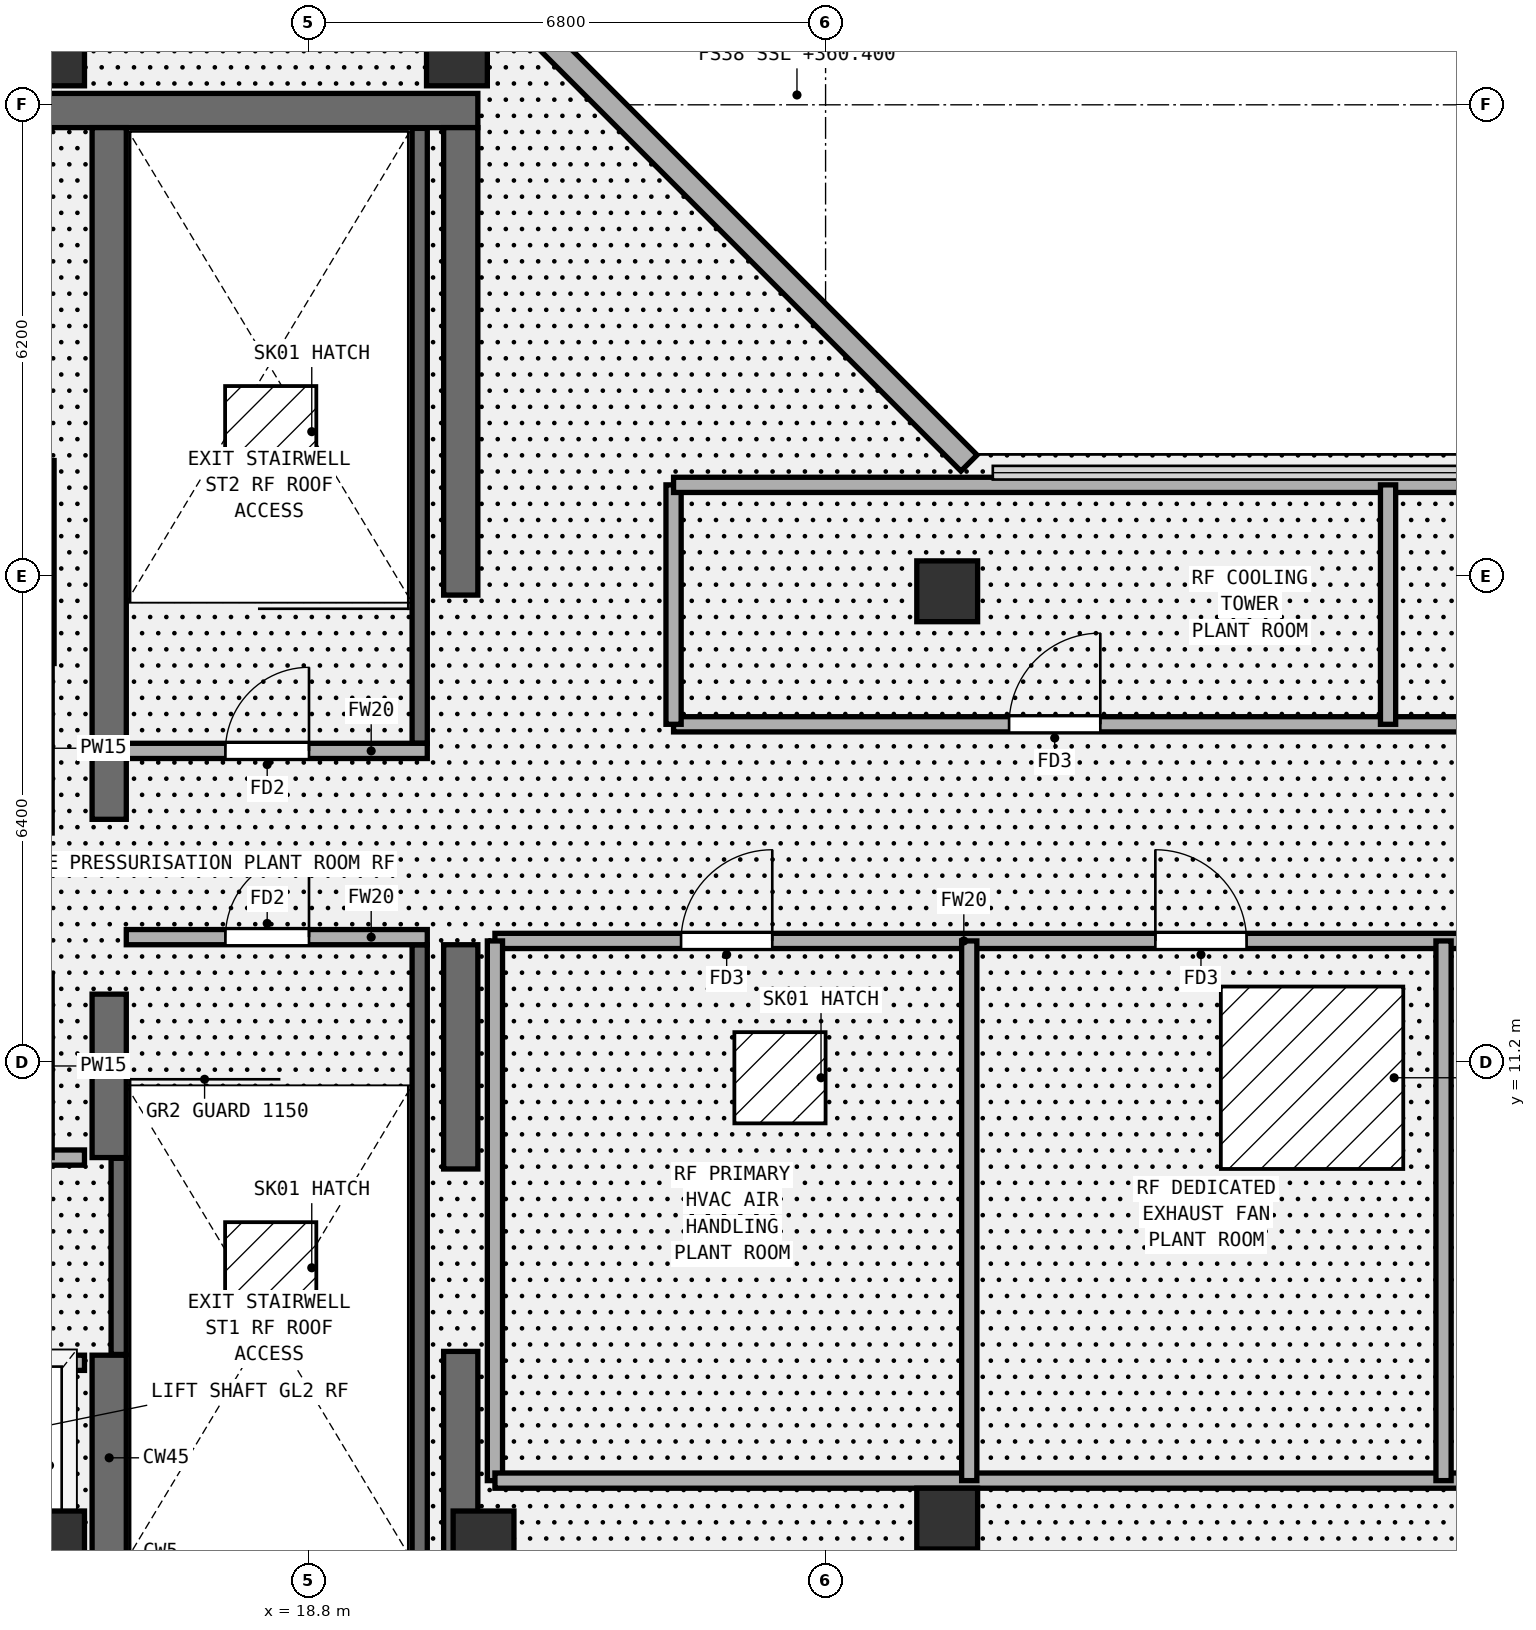
"""IFC4 building model, lengths in metres.
Left out: names, types, materials, properties, quantities, classifications, styles, units other than length and angle.
Written with IfcOpenShell. Run it as: python <this file> out.ifc"""

import sys

from ifc_helpers import new_model, si_unit, direction, frame, frame_2d, origin, origin_2d, place, context, subcontext, project, spatial, rectangle, extrude, element, fill, save


model = new_model("IFC4")
c1 = context("Model", 3, precision=1e-05, world=origin(), true_north=direction((0.0, 1.0)))
c2 = subcontext(c1, "Body", "Model", "MODEL_VIEW")
j1 = project(units=[si_unit("LENGTHUNIT", "METRE"), si_unit("PLANEANGLEUNIT", "RADIAN")], contexts=[c1])
p1 = place(None, origin())
s1 = spatial("IfcSite", under=j1, at=p1, CompositionType="ELEMENT")
p2 = place(p1, origin())
s2 = spatial("IfcBuilding", under=s1, at=p2, CompositionType="ELEMENT")
p3 = place(p2, frame((0.0, 0.0, 360.4)))
s3 = spatial("IfcBuildingStorey", under=s2, at=p3, CompositionType="ELEMENT", Elevation=360.4)
p4 = place(p3, frame((7.225, 23.725, 0.0), z_axis=(0.0, 0.0, 1.0), x_axis=(1.0, 0.0, 0.0)))
e1 = element("IfcWall", 1, at=p4, inside=s3, PredefinedType="SHEAR", context=c2, shape_type="SweptSolid", body=[
    extrude(rectangle(XDim=13.8, YDim=0.45, at=frame_2d((6.9, 0.0))), origin(), (0.0, 0.0, 1.0), 4.659),
])
p5 = place(p3, frame((20.8, 4.65, 0.0), z_axis=(0.0, 0.0, 1.0), x_axis=(0.0, 1.0, 0.0)))
e2 = element("IfcWall", 2, at=p5, inside=s3, PredefinedType="SHEAR", context=c2, shape_type="SweptSolid", body=[
    extrude(rectangle(XDim=2.75, YDim=0.45, at=frame_2d((1.375, 0.0))), origin(), (0.0, 0.0, 1.0), 4.787),
])
p6 = place(p3, frame((20.8, 9.8, 0.0), z_axis=(0.0, 0.0, 1.0), x_axis=(0.0, 1.0, 0.0)))
e3 = element("IfcWall", 3, at=p6, inside=s3, PredefinedType="SHEAR", context=c2, shape_type="SweptSolid", body=[
    extrude(rectangle(XDim=2.95, YDim=0.45, at=frame_2d((1.475, 0.0))), origin(), (0.0, 0.0, 1.0), 4.787),
])
p7 = place(p3, frame((20.8, 17.35, 0.0), z_axis=(0.0, 0.0, 1.0), x_axis=(0.0, 1.0, 0.0)))
e4 = element("IfcWall", 4, at=p7, inside=s3, PredefinedType="SHEAR", context=c2, shape_type="SweptSolid", body=[
    extrude(rectangle(XDim=6.15, YDim=0.45, at=frame_2d((3.075, 0.0))), origin(), (0.0, 0.0, 1.0), 4.787),
])
p8 = place(p3, frame((16.175, 4.65, 0.0), z_axis=(0.0, 0.0, 1.0), x_axis=(0.0, 1.0, 0.0)))
e5 = element("IfcWall", 5, at=p8, inside=s3, PredefinedType="SHEAR", context=c2, shape_type="SweptSolid", body=[
    extrude(rectangle(XDim=2.7, YDim=0.45, at=frame_2d((1.35, 0.0))), origin(), (0.0, 0.0, 1.0), 4.698),
])
p9 = place(p3, frame((16.175, 9.95, 0.0), z_axis=(0.0, 0.0, 1.0), x_axis=(0.0, 1.0, 0.0)))
e6 = element("IfcWall", 6, at=p9, inside=s3, PredefinedType="SHEAR", context=c2, shape_type="SweptSolid", body=[
    extrude(rectangle(XDim=2.15, YDim=0.45, at=frame_2d((1.075, 0.0))), origin(), (0.0, 0.0, 1.0), 4.698),
])
p10 = place(p3, frame((16.175, 14.4, 0.0), z_axis=(0.0, 0.0, 1.0), x_axis=(0.0, 1.0, 0.0)))
e7 = element("IfcWall", 7, at=p10, inside=s3, PredefinedType="SHEAR", context=c2, shape_type="SweptSolid", body=[
    extrude(rectangle(XDim=9.1, YDim=0.45, at=frame_2d((4.55, 0.0))), origin(), (0.0, 0.0, 1.0), 4.698),
])
p11 = place(p3, frame((15.45, 4.9, 0.0), z_axis=(0.0, 0.0, 1.0), x_axis=(1.0, 0.0, 0.0)))
e8 = element("IfcColumn", 8, at=p11, inside=s3, PredefinedType="COLUMN", context=c2, shape_type="SweptSolid", body=[
    extrude(rectangle(XDim=0.8, YDim=0.8, at=origin_2d()), origin(), (0.0, 0.0, 1.0), 4.684),
])
p12 = place(p3, frame((21.1, 4.9, 0.0), z_axis=(0.0, 0.0, 1.0), x_axis=(1.0, 0.0, 0.0)))
e9 = element("IfcColumn", 9, at=p12, inside=s3, PredefinedType="COLUMN", context=c2, shape_type="SweptSolid", body=[
    extrude(rectangle(XDim=0.8, YDim=0.8, at=origin_2d()), origin(), (0.0, 0.0, 1.0), 4.793),
])
p13 = place(p3, frame((15.45, 24.45, 0.0), z_axis=(0.0, 0.0, 1.0), x_axis=(1.0, 0.0, 0.0)))
e10 = element("IfcColumn", 10, at=p13, inside=s3, PredefinedType="COLUMN", context=c2, shape_type="SweptSolid", body=[
    extrude(rectangle(XDim=0.8, YDim=0.8, at=origin_2d()), origin(), (0.0, 0.0, 1.0), 4.684),
])
p14 = place(p3, frame((20.75, 24.45, 0.0), z_axis=(0.0, 0.0, 1.0), x_axis=(1.0, 0.0, 0.0)))
e11 = element("IfcColumn", 11, at=p14, inside=s3, PredefinedType="COLUMN", context=c2, shape_type="SweptSolid", body=[
    extrude(rectangle(XDim=0.8, YDim=0.8, at=origin_2d()), origin(), (0.0, 0.0, 1.0), 4.786),
])
for number, where, z_axis, x_axis in (
    (12, (27.2, 5.2, 0.0), (0.0, 0.0, 1.0), (1.0, 0.0, 0.0)),
    (13, (27.2, 17.4, 0.0), (0.0, 0.0, 1.0), (1.0, 0.0, 0.0)),
):
    element("IfcColumn", number, at=place(p3, frame(where, z_axis=z_axis, x_axis=x_axis)), inside=s3, PredefinedType="COLUMN", context=c2, shape_type="SweptSolid", body=[
        extrude(rectangle(XDim=0.8, YDim=0.8, at=origin_2d()), origin(), (0.0, 0.0, 1.0), 4.91),
    ])
p15 = place(p3, frame((27.487, 19.087, 0.0), z_axis=(0.0, 0.0, 1.0), x_axis=(-0.707106781187, 0.707106781187, 0.0)))
e14 = element("IfcWall", 14, at=p15, inside=s3, PredefinedType="PARAPET", context=c2, shape_type="SweptSolid", body=[
    extrude(rectangle(XDim=9.051, YDim=0.3, at=frame_2d((4.525, 0.0))), origin(), (0.0, 0.0, 1.0), 4.805),
])
p16 = place(p3, frame((16.3, 7.36, 0.0), z_axis=(0.0, 0.0, 1.0), x_axis=(0.0, 1.0, 0.0)))
e15 = element("IfcWall", 15, at=p16, inside=s3, PredefinedType="SHEAR", context=c2, shape_type="SweptSolid", body=[
    extrude(rectangle(XDim=2.58, YDim=0.2, at=frame_2d((1.29, 0.0))), origin(), (0.0, 0.0, 1.0), 4.48),
])
p17 = place(p3, frame((20.26, 4.66, 0.0), z_axis=(0.0, 0.0, 1.0), x_axis=(0.0, 1.0, 0.0)))
e16 = element("IfcWall", 16, at=p17, inside=s3, PredefinedType="SHEAR", context=c2, shape_type="SweptSolid", body=[
    extrude(rectangle(XDim=8.09, YDim=0.2, at=frame_2d((4.045, 0.0))), origin(), (0.0, 0.0, 1.0), 4.48),
])
p18 = place(p3, frame((16.4, 12.85, 0.0), z_axis=(0.0, 0.0, 1.0), x_axis=(1.0, 0.0, 0.0)))
e17 = element("IfcWall", 17, at=p18, inside=s3, PredefinedType="PARTITIONING", context=c2, shape_type="SweptSolid", body=[
    extrude(rectangle(XDim=3.96, YDim=0.2, at=frame_2d((1.98, 0.0))), origin(), (0.0, 0.0, 1.0), 4.48),
])
p19 = place(p18, frame((1.304, 0.0, 0.0)))
e18 = element("IfcOpeningElement", 18, at=p19, cuts=e17, PredefinedType="OPENING", context=c2, shape_type="SweptSolid", body=[
    extrude(rectangle(XDim=1.1, YDim=2.2, at=frame_2d((0.55, 1.1))), frame((0.0, 0.11, 0.0), z_axis=(0.0, -1.0, 0.0), x_axis=(1.0, 0.0, 0.0)), (0.0, 0.0, 1.0), 0.22),
])
p20 = place(p3, frame((20.26, 15.4, 0.0), z_axis=(0.0, 0.0, 1.0), x_axis=(0.0, 1.0, 0.0)))
e19 = element("IfcWall", 19, at=p20, inside=s3, PredefinedType="SHEAR", context=c2, shape_type="SweptSolid", body=[
    extrude(rectangle(XDim=8.09, YDim=0.2, at=frame_2d((4.045, 0.0))), origin(), (0.0, 0.0, 1.0), 4.48),
])
p21 = place(p3, frame((16.41, 15.3, 0.0), z_axis=(0.0, 0.0, 1.0), x_axis=(1.0, 0.0, 0.0)))
e20 = element("IfcWall", 20, at=p21, inside=s3, PredefinedType="PARTITIONING", context=c2, shape_type="SweptSolid", body=[
    extrude(rectangle(XDim=3.95, YDim=0.2, at=frame_2d((1.975, 0.0))), origin(), (0.0, 0.0, 1.0), 4.48),
])
p22 = place(p21, frame((1.294, 0.0, 0.0)))
e21 = element("IfcOpeningElement", 21, at=p22, cuts=e20, PredefinedType="OPENING", context=c2, shape_type="SweptSolid", body=[
    extrude(rectangle(XDim=1.1, YDim=2.2, at=frame_2d((0.55, 1.1))), frame((0.0, 0.11, 0.0), z_axis=(0.0, -1.0, 0.0), x_axis=(1.0, 0.0, 0.0)), (0.0, 0.0, 1.0), 0.22),
])
p23 = place(p3, frame((7.5, 7.25, 0.0), z_axis=(0.0, 0.0, 1.0), x_axis=(1.0, 0.0, 0.0)))
e22 = element("IfcWall", 22, at=p23, inside=s3, PredefinedType="PARTITIONING", context=c2, shape_type="SweptSolid", body=[
    extrude(rectangle(XDim=8.35, YDim=0.2, at=frame_2d((4.175, 0.0))), origin(), (0.0, 0.0, 1.0), 4.48),
])
p24 = place(p23, frame((0.53, 0.0, 0.0)))
e23 = element("IfcOpeningElement", 23, at=p24, cuts=e22, PredefinedType="OPENING", context=c2, shape_type="SweptSolid", body=[
    extrude(rectangle(XDim=1.1, YDim=2.2, at=frame_2d((0.55, 1.1))), frame((0.0, 0.11, 0.0), z_axis=(0.0, -1.0, 0.0), x_axis=(1.0, 0.0, 0.0)), (0.0, 0.0, 1.0), 0.22),
])
p25 = place(p23, frame((2.37, 0.0, 0.0)))
e24 = element("IfcOpeningElement", 24, at=p25, cuts=e22, PredefinedType="OPENING", context=c2, shape_type="SweptSolid", body=[
    extrude(rectangle(XDim=1.1, YDim=2.2, at=frame_2d((0.55, 1.1))), frame((0.0, 0.11, 0.0), z_axis=(0.0, -1.0, 0.0), x_axis=(1.0, 0.0, 0.0)), (0.0, 0.0, 1.0), 0.22),
])
p26 = place(p23, frame((4.33, 0.0, 0.0)))
e25 = element("IfcOpeningElement", 25, at=p26, cuts=e22, PredefinedType="OPENING", context=c2, shape_type="SweptSolid", body=[
    extrude(rectangle(XDim=1.1, YDim=2.2, at=frame_2d((0.55, 1.1))), frame((0.0, 0.11, 0.0), z_axis=(0.0, -1.0, 0.0), x_axis=(1.0, 0.0, 0.0)), (0.0, 0.0, 1.0), 0.22),
])
p27 = place(p23, frame((6.5, 0.0, 0.0)))
e26 = element("IfcOpeningElement", 26, at=p27, cuts=e22, PredefinedType="OPENING", context=c2, shape_type="SweptSolid", body=[
    extrude(rectangle(XDim=1.1, YDim=2.2, at=frame_2d((0.55, 1.1))), frame((0.0, 0.11, 0.0), z_axis=(0.0, -1.0, 0.0), x_axis=(1.0, 0.0, 0.0)), (0.0, 0.0, 1.0), 0.22),
])
p28 = place(p3, frame((7.5, 9.95, 0.0), z_axis=(0.0, 0.0, 1.0), x_axis=(1.0, 0.0, 0.0)))
e27 = element("IfcWall", 27, at=p28, inside=s3, PredefinedType="PARTITIONING", context=c2, shape_type="SweptSolid", body=[
    extrude(rectangle(XDim=8.35, YDim=0.2, at=frame_2d((4.175, 0.0))), origin(), (0.0, 0.0, 1.0), 4.48),
])
p29 = place(p3, frame((15.35, 9.95, 0.0), z_axis=(0.0, 0.0, 1.0), x_axis=(0.0, 1.0, 0.0)))
e28 = element("IfcWall", 28, at=p29, inside=s3, PredefinedType="PARTITIONING", context=c2, shape_type="SweptSolid", body=[
    extrude(rectangle(XDim=2.41, YDim=0.15, at=frame_2d((1.205, 0.0))), origin(), (0.0, 0.0, 1.0), 4.48),
])
p30 = place(p3, frame((15.35, 14.22, 0.0), z_axis=(0.0, 0.0, 1.0), x_axis=(0.0, 1.0, 0.0)))
e29 = element("IfcWall", 29, at=p30, inside=s3, PredefinedType="PARTITIONING", context=c2, shape_type="SweptSolid", body=[
    extrude(rectangle(XDim=2.23, YDim=0.15, at=frame_2d((1.115, 0.0))), origin(), (0.0, 0.0, 1.0), 4.48),
])
p31 = place(p3, frame((15.35, 16.45, 0.0), z_axis=(0.0, 0.0, 1.0), x_axis=(0.0, 1.0, 0.0)))
e30 = element("IfcWall", 30, at=p31, inside=s3, PredefinedType="PARTITIONING", context=c2, shape_type="SweptSolid", body=[
    extrude(rectangle(XDim=2.67, YDim=0.2, at=frame_2d((1.335, 0.0))), origin(), (0.0, 0.0, 1.0), 4.48),
])
p32 = place(p3, frame((23.6, 15.65, 0.0), z_axis=(0.0, 0.0, 1.0), x_axis=(1.0, 0.0, 0.0)))
e31 = element("IfcWall", 31, at=p32, inside=s3, PredefinedType="PARTITIONING", context=c2, shape_type="SweptSolid", body=[
    extrude(rectangle(XDim=20.2, YDim=0.2, at=frame_2d((10.1, 0.0))), origin(), (0.0, 0.0, 1.0), 4.48),
])
p33 = place(p32, frame((4.414, 0.0, 0.0)))
e32 = element("IfcOpeningElement", 32, at=p33, cuts=e31, PredefinedType="OPENING", context=c2, shape_type="SweptSolid", body=[
    extrude(rectangle(XDim=1.2, YDim=2.25, at=frame_2d((0.6, 1.125))), frame((0.0, 0.11, 0.0), z_axis=(0.0, -1.0, 0.0), x_axis=(1.0, 0.0, 0.0)), (0.0, 0.0, 1.0), 0.22),
])
p34 = place(p32, frame((14.271, 0.0, 0.0)))
e33 = element("IfcOpeningElement", 33, at=p34, cuts=e31, PredefinedType="OPENING", context=c2, shape_type="SweptSolid", body=[
    extrude(rectangle(XDim=1.2, YDim=2.25, at=frame_2d((0.6, 1.125))), frame((0.0, 0.11, 0.0), z_axis=(0.0, -1.0, 0.0), x_axis=(1.0, 0.0, 0.0)), (0.0, 0.0, 1.0), 0.22),
])
p35 = place(p3, frame((23.6, 15.65, 0.0), z_axis=(0.0, 0.0, 1.0), x_axis=(0.0, 1.0, 0.0)))
e34 = element("IfcWall", 34, at=p35, inside=s3, PredefinedType="PARTITIONING", context=c2, shape_type="SweptSolid", body=[
    extrude(rectangle(XDim=3.15, YDim=0.2, at=frame_2d((1.575, 0.0))), origin(), (0.0, 0.0, 1.0), 4.48),
])
p36 = place(p3, frame((23.6, 18.8, 0.0), z_axis=(0.0, 0.0, 1.0), x_axis=(1.0, 0.0, 0.0)))
e35 = element("IfcWall", 35, at=p36, inside=s3, PredefinedType="PARTITIONING", context=c2, shape_type="SweptSolid", body=[
    extrude(rectangle(XDim=20.2, YDim=0.2, at=frame_2d((10.1, 0.0))), origin(), (0.0, 0.0, 1.0), 4.48),
])
p37 = place(p3, frame((33.0, 15.65, 0.0), z_axis=(0.0, 0.0, 1.0), x_axis=(0.0, 1.0, 0.0)))
e36 = element("IfcWall", 36, at=p37, inside=s3, PredefinedType="PARTITIONING", context=c2, shape_type="SweptSolid", body=[
    extrude(rectangle(XDim=3.15, YDim=0.2, at=frame_2d((1.575, 0.0))), origin(), (0.0, 0.0, 1.0), 4.48),
])
p38 = place(p3, frame((21.25, 12.8, 0.0), z_axis=(0.0, 0.0, 1.0), x_axis=(1.0, 0.0, 0.0)))
e37 = element("IfcWall", 37, at=p38, inside=s3, PredefinedType="PARTITIONING", context=c2, shape_type="SweptSolid", body=[
    extrude(rectangle(XDim=24.95, YDim=0.2, at=frame_2d((12.475, 0.0))), origin(), (0.0, 0.0, 1.0), 4.48),
])
p39 = place(p38, frame((2.448, 0.0, 0.0)))
e38 = element("IfcOpeningElement", 38, at=p39, cuts=e37, PredefinedType="OPENING", context=c2, shape_type="SweptSolid", body=[
    extrude(rectangle(XDim=1.2, YDim=2.25, at=frame_2d((0.6, 1.125))), frame((0.0, 0.11, 0.0), z_axis=(0.0, -1.0, 0.0), x_axis=(1.0, 0.0, 0.0)), (0.0, 0.0, 1.0), 0.22),
])
p40 = place(p38, frame((8.689, 0.0, 0.0)))
e39 = element("IfcOpeningElement", 39, at=p40, cuts=e37, PredefinedType="OPENING", context=c2, shape_type="SweptSolid", body=[
    extrude(rectangle(XDim=1.2, YDim=2.25, at=frame_2d((0.6, 1.125))), frame((0.0, 0.11, 0.0), z_axis=(0.0, -1.0, 0.0), x_axis=(1.0, 0.0, 0.0)), (0.0, 0.0, 1.0), 0.22),
])
p41 = place(p38, frame((14.924, 0.0, 0.0)))
e40 = element("IfcOpeningElement", 40, at=p41, cuts=e37, PredefinedType="OPENING", context=c2, shape_type="SweptSolid", body=[
    extrude(rectangle(XDim=1.2, YDim=2.25, at=frame_2d((0.6, 1.125))), frame((0.0, 0.11, 0.0), z_axis=(0.0, -1.0, 0.0), x_axis=(1.0, 0.0, 0.0)), (0.0, 0.0, 1.0), 0.22),
])
p42 = place(p38, frame((21.159, 0.0, 0.0)))
e41 = element("IfcOpeningElement", 41, at=p42, cuts=e37, PredefinedType="OPENING", context=c2, shape_type="SweptSolid", body=[
    extrude(rectangle(XDim=1.2, YDim=2.25, at=frame_2d((0.6, 1.125))), frame((0.0, 0.11, 0.0), z_axis=(0.0, -1.0, 0.0), x_axis=(1.0, 0.0, 0.0)), (0.0, 0.0, 1.0), 0.22),
])
p43 = place(p3, frame((21.25, 5.7, 0.0), z_axis=(0.0, 0.0, 1.0), x_axis=(0.0, 1.0, 0.0)))
e42 = element("IfcWall", 42, at=p43, inside=s3, PredefinedType="PARTITIONING", context=c2, shape_type="SweptSolid", body=[
    extrude(rectangle(XDim=7.1, YDim=0.2, at=frame_2d((3.55, 0.0))), origin(), (0.0, 0.0, 1.0), 4.48),
])
p44 = place(p3, frame((21.25, 5.7, 0.0), z_axis=(0.0, 0.0, 1.0), x_axis=(1.0, 0.0, 0.0)))
e43 = element("IfcWall", 43, at=p44, inside=s3, PredefinedType="PARTITIONING", context=c2, shape_type="SweptSolid", body=[
    extrude(rectangle(XDim=24.95, YDim=0.2, at=frame_2d((12.475, 0.0))), origin(), (0.0, 0.0, 1.0), 4.48),
])
p45 = place(p3, frame((27.49, 5.7, 0.0), z_axis=(0.0, 0.0, 1.0), x_axis=(0.0, 1.0, 0.0)))
e44 = element("IfcWall", 44, at=p45, inside=s3, PredefinedType="PARTITIONING", context=c2, shape_type="SweptSolid", body=[
    extrude(rectangle(XDim=7.1, YDim=0.2, at=frame_2d((3.55, 0.0))), origin(), (0.0, 0.0, 1.0), 4.41),
])
p46 = place(p3, frame((33.73, 5.7, 0.0), z_axis=(0.0, 0.0, 1.0), x_axis=(0.0, 1.0, 0.0)))
e45 = element("IfcWall", 45, at=p46, inside=s3, PredefinedType="PARTITIONING", context=c2, shape_type="SweptSolid", body=[
    extrude(rectangle(XDim=7.1, YDim=0.2, at=frame_2d((3.55, 0.0))), origin(), (0.0, 0.0, 1.0), 4.48),
])
p47 = place(p3, frame((6.8, 4.0, 4.799), z_axis=(-0.019179722964, -9.68549e-07, 0.999816052195), x_axis=(0.999816052195, -8e-12, 0.019179722964)))
p48 = place(p47, frame((11.502, 4.5, 0.0)))
p49 = place(p48, frame((0.0, 0.0, -0.05)))
e46 = element("IfcWindow", 46, at=p49, inside=s3, PartitioningType="SINGLE_PANEL", PredefinedType="SKYLIGHT", context=c2, shape_type="SweptSolid", body=[
    extrude(rectangle(XDim=1.2, YDim=1.2, at=origin_2d()), origin(), (0.0, 0.0, 1.0), 0.05),
])
p50 = place(p47, frame((11.502, 15.5, 0.0)))
p51 = place(p50, frame((0.0, 0.0, -0.05)))
e47 = element("IfcWindow", 47, at=p51, inside=s3, PartitioningType="SINGLE_PANEL", PredefinedType="SKYLIGHT", context=c2, shape_type="SweptSolid", body=[
    extrude(rectangle(XDim=1.2, YDim=1.2, at=origin_2d()), origin(), (0.0, 0.0, 1.0), 0.05),
])
p52 = place(p47, frame((18.203, 7.0, 0.0)))
p53 = place(p52, frame((0.0, 0.0, -0.05)))
e48 = element("IfcWindow", 48, at=p53, inside=s3, PartitioningType="SINGLE_PANEL", PredefinedType="SKYLIGHT", context=c2, shape_type="SweptSolid", body=[
    extrude(rectangle(XDim=1.2, YDim=1.2, at=origin_2d()), origin(), (0.0, 0.0, 1.0), 0.05),
])
p54 = place(p47, frame((25.205, 7.0, 0.0)))
p55 = place(p54, frame((0.0, 0.0, -0.05)))
e49 = element("IfcWindow", 49, at=p55, inside=s3, PartitioningType="SINGLE_PANEL", PredefinedType="SKYLIGHT", context=c2, shape_type="SweptSolid", body=[
    extrude(rectangle(XDim=2.4, YDim=2.4, at=origin_2d()), origin(), (0.0, 0.0, 1.0), 0.05),
])
p56 = place(p19, frame((1.1, 0.0, 0.0), z_axis=(0.0, 0.0, 1.0), x_axis=(-1.0, 0.0, 0.0)))
e50 = element("IfcDoor", 50, at=p56, inside=s3, OperationType="SINGLE_SWING_LEFT", PredefinedType="DOOR", context=c2, shape_type="SweptSolid", body=[
    extrude(rectangle(XDim=1.1, YDim=2.2, at=frame_2d((0.55, 1.1))), frame((0.0, 0.025, 0.0), z_axis=(0.0, -1.0, 0.0), x_axis=(1.0, 0.0, 0.0)), (0.0, 0.0, 1.0), 0.05),
])
fill(e18, e50)
p57 = place(p22, origin())
e51 = element("IfcDoor", 51, at=p57, inside=s3, OperationType="SINGLE_SWING_RIGHT", PredefinedType="DOOR", context=c2, shape_type="SweptSolid", body=[
    extrude(rectangle(XDim=1.1, YDim=2.2, at=frame_2d((0.55, 1.1))), frame((0.0, 0.025, 0.0), z_axis=(0.0, -1.0, 0.0), x_axis=(1.0, 0.0, 0.0)), (0.0, 0.0, 1.0), 0.05),
])
fill(e21, e51)
p58 = place(p33, origin())
e52 = element("IfcDoor", 52, at=p58, inside=s3, OperationType="SINGLE_SWING_RIGHT", PredefinedType="DOOR", context=c2, shape_type="SweptSolid", body=[
    extrude(rectangle(XDim=1.2, YDim=2.25, at=frame_2d((0.6, 1.125))), frame((0.0, 0.025, 0.0), z_axis=(0.0, -1.0, 0.0), x_axis=(1.0, 0.0, 0.0)), (0.0, 0.0, 1.0), 0.05),
])
fill(e32, e52)
p59 = place(p39, origin())
e53 = element("IfcDoor", 53, at=p59, inside=s3, OperationType="SINGLE_SWING_RIGHT", PredefinedType="DOOR", context=c2, shape_type="SweptSolid", body=[
    extrude(rectangle(XDim=1.2, YDim=2.25, at=frame_2d((0.6, 1.125))), frame((0.0, 0.025, 0.0), z_axis=(0.0, -1.0, 0.0), x_axis=(1.0, 0.0, 0.0)), (0.0, 0.0, 1.0), 0.05),
])
fill(e38, e53)
p60 = place(p40, origin())
e54 = element("IfcDoor", 54, at=p60, inside=s3, OperationType="SINGLE_SWING_LEFT", PredefinedType="DOOR", context=c2, shape_type="SweptSolid", body=[
    extrude(rectangle(XDim=1.2, YDim=2.25, at=frame_2d((0.6, 1.125))), frame((0.0, 0.025, 0.0), z_axis=(0.0, -1.0, 0.0), x_axis=(1.0, 0.0, 0.0)), (0.0, 0.0, 1.0), 0.05),
])
fill(e39, e54)
save(model, sys.argv[1])
